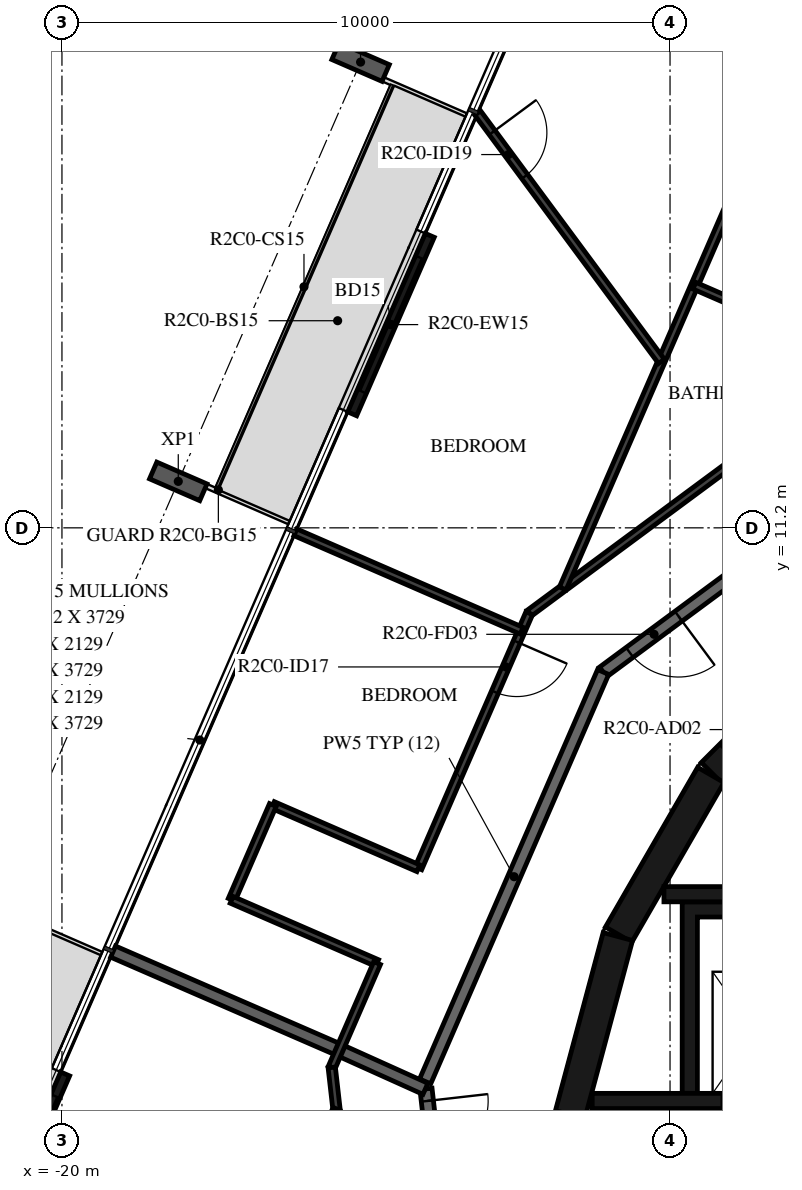
"""IFC4 building model, lengths in metres.
Left out: names, types, materials, properties, quantities, classifications, styles, units other than length and angle.
Written with IfcOpenShell. Run it as: python <this file> out.ifc"""

import sys

from ifc_helpers import new_model, si_unit, direction, frame, frame_2d, origin, origin_2d, place, context, subcontext, project, spatial, polyline, rectangle, i_section, outline, extrude, element, fill, save


model = new_model("IFC4")
c1 = context("Model", 3, precision=1e-05, world=origin(), true_north=direction((0.0, 1.0)))
c2 = subcontext(c1, "Body", "Model", "MODEL_VIEW")
j1 = project(units=[si_unit("LENGTHUNIT", "METRE"), si_unit("PLANEANGLEUNIT", "RADIAN")], contexts=[c1])
p1 = place(None, origin())
s1 = spatial("IfcSite", under=j1, at=p1, CompositionType="ELEMENT")
p2 = place(p1, origin())
s2 = spatial("IfcBuilding", under=s1, at=p2, CompositionType="ELEMENT")
p3 = place(p2, frame((0.0, 0.0, 104.7)))
s3 = spatial("IfcBuildingStorey", under=s2, at=p3, CompositionType="ELEMENT", Elevation=104.7)
for number, where, z_axis, x_axis in (
    (1, (-15.089, 18.859, -0.38), (0.0, 0.0, 1.0), (0.399, 0.917, 0.0)),
    (2, (-18.087, 11.964, -0.38), (0.0, 0.0, 1.0), (0.399, 0.917, 0.0)),
):
    element("IfcColumn", number, at=place(p3, frame(where, z_axis=z_axis, x_axis=x_axis)), inside=s3, PredefinedType="COLUMN", context=c2, shape_type="SweptSolid", body=[
        extrude(i_section(OverallWidth=0.3, OverallDepth=0.9, WebThickness=0.019, FlangeThickness=0.035, FilletRadius=0.03, at=origin_2d()), origin(), (0.0, 0.0, 1.0), 2.616),
    ])
p4 = place(p3, frame((-13.951, 16.01, 0.0), z_axis=(0.0, 0.0, 1.0), x_axis=(-0.398720531764, -0.917072482168, 0.0)))
e3 = element("IfcWall", 3, at=p4, inside=s3, PredefinedType="STANDARD", context=c2, shape_type="SweptSolid", body=[
    extrude(rectangle(XDim=3.2, YDim=0.16, at=frame_2d((1.6, 0.0))), origin(), (0.0, 0.0, 1.0), 3.05),
])
p5 = place(p4, frame((0.4, 0.0, 0.0)))
e4 = element("IfcOpeningElement", 4, at=p5, cuts=e3, PredefinedType="OPENING", context=c2, shape_type="SweptSolid", body=[
    extrude(rectangle(XDim=2.4, YDim=2.4, at=frame_2d((1.2, 1.2))), frame((0.0, 0.09, 0.0), z_axis=(0.0, -1.0, 0.0), x_axis=(1.0, 0.0, 0.0)), (0.0, 0.0, 1.0), 0.18),
])
p6 = place(p3, frame((-19.947, 2.219, 0.0), z_axis=(0.0, 0.0, 1.0), x_axis=(-0.398784695066, -0.917044582876, 0.0)))
e5 = element("IfcWall", 5, at=p6, inside=s3, PredefinedType="STANDARD", context=c2, shape_type="SweptSolid", body=[
    extrude(rectangle(XDim=3.2, YDim=0.16, at=frame_2d((1.6, 0.0))), origin(), (0.0, 0.0, 1.0), 3.05),
])
p7 = place(p6, frame((0.4, 0.0, 0.0)))
e6 = element("IfcOpeningElement", 6, at=p7, cuts=e5, PredefinedType="OPENING", context=c2, shape_type="SweptSolid", body=[
    extrude(rectangle(XDim=2.4, YDim=2.4, at=frame_2d((1.2, 1.2))), frame((0.0, 0.09, 0.0), z_axis=(0.0, -1.0, 0.0), x_axis=(1.0, 0.0, 0.0)), (0.0, 0.0, 1.0), 0.18),
])
p8 = place(p3, frame((-7.164, 9.308, 0.0), z_axis=(0.0, 0.0, 1.0), x_axis=(-0.707106781187, -0.707106781187, 0.0)))
e7 = element("IfcWall", 7, at=p8, inside=s3, PredefinedType="SHEAR", context=c2, shape_type="SweptSolid", body=[
    extrude(rectangle(XDim=3.032, YDim=0.5, at=frame_2d((1.516, 0.0))), origin(), (0.0, 0.0, 1.0), 3.05),
])
p9 = place(p8, frame((1.416, 0.0, 0.0)))
e8 = element("IfcOpeningElement", 8, at=p9, cuts=e7, PredefinedType="OPENING", context=c2, shape_type="SweptSolid", body=[
    extrude(rectangle(XDim=1.2, YDim=2.1, at=frame_2d((0.6, 1.05))), frame((0.0, 0.26, 0.0), z_axis=(0.0, -1.0, 0.0), x_axis=(1.0, 0.0, 0.0)), (0.0, 0.0, 1.0), 0.52),
])
for number, where, z_axis, x_axis in (
    (9, (-9.329, 7.137, 0.0), (0.0, 0.0, 1.0), (-0.5, -0.866, 0.0)),
    (10, (-10.858, 4.479, 0.0), (0.0, 0.0, 1.0), (-0.259, -0.966, 0.0)),
):
    element("IfcWall", number, at=place(p3, frame(where, z_axis=z_axis, x_axis=x_axis)), inside=s3, PredefinedType="SHEAR", context=c2, shape_type="SweptSolid", body=[
        extrude(rectangle(XDim=3.033, YDim=0.5, at=frame_2d((1.516, 0.0))), origin(), (0.0, 0.0, 1.0), 3.05),
    ])
p10 = place(p3, frame((-7.0, 5.175, 0.0), z_axis=(0.0, 0.0, 1.0), x_axis=(-1.0, 0.0, 0.0)))
e11 = element("IfcWall", 11, at=p10, inside=s3, PredefinedType="SHEAR", context=c2, shape_type="SweptSolid", body=[
    extrude(rectangle(XDim=3.1, YDim=0.25, at=frame_2d((1.55, 0.0))), origin(), (0.0, 0.0, 1.0), 3.05),
])
p11 = place(p3, origin())
e12 = element("IfcWall", 12, at=p11, inside=s3, PredefinedType="SHEAR", context=c2, shape_type="SweptSolid", body=[
    extrude(outline(polyline([(-9.55, 4.8), (-7.65, 4.8), (-7.65, 1.9), (-7.4, 1.9), (-7.4, 4.8), (-5.5, 4.8), (-5.5, 1.9), (-5.25, 1.9), (-5.25, 4.8), (-3.35, 4.8), (-3.35, 1.9), (-3.1, 1.9), (-3.1, 4.8), (-1.2, 4.8), (-1.2, 1.9), (-0.95, 1.9), (-0.95, 4.8), (0.95, 4.8), (0.95, 1.9), (1.2, 1.9), (1.2, 4.8), (3.1, 4.8), (3.1, 1.9), (3.35, 1.9), (3.35, 4.8), (5.25, 4.8), (5.25, 1.9), (5.5, 1.9), (5.5, 4.8), (7.4, 4.8), (7.4, 1.9), (7.65, 1.9), (7.65, 4.8), (9.55, 4.8), (9.55, 1.9), (9.8, 1.9), (9.8, 4.8), (9.8, 5.05), (-9.8, 5.05), (-9.8, 4.8), (-9.8, 1.9), (-9.55, 1.9), (-9.55, 4.8)])), origin(), (0.0, 0.0, 1.0), 3.05),
])
p12 = place(p3, frame((-11.28, 1.775, 0.0), z_axis=(0.0, 0.0, 1.0), x_axis=(1.0, 0.0, 0.0)))
e13 = element("IfcWall", 13, at=p12, inside=s3, PredefinedType="SHEAR", context=c2, shape_type="SweptSolid", body=[
    extrude(rectangle(XDim=14.38, YDim=0.25, at=frame_2d((7.19, 0.0))), origin(), (0.0, 0.0, 1.0), 3.05),
])
p13 = place(p12, frame((2.13, 0.0, 0.0)))
e14 = element("IfcOpeningElement", 14, at=p13, cuts=e13, PredefinedType="OPENING", context=c2, shape_type="SweptSolid", body=[
    extrude(rectangle(XDim=1.1, YDim=2.1, at=frame_2d((0.55, 1.05))), frame((0.0, 0.135, 0.0), z_axis=(0.0, -1.0, 0.0), x_axis=(1.0, 0.0, 0.0)), (0.0, 0.0, 1.0), 0.27),
])
p14 = place(p12, frame((4.28, 0.0, 0.0)))
e15 = element("IfcOpeningElement", 15, at=p14, cuts=e13, PredefinedType="OPENING", context=c2, shape_type="SweptSolid", body=[
    extrude(rectangle(XDim=1.1, YDim=2.1, at=frame_2d((0.55, 1.05))), frame((0.0, 0.135, 0.0), z_axis=(0.0, -1.0, 0.0), x_axis=(1.0, 0.0, 0.0)), (0.0, 0.0, 1.0), 0.27),
])
p15 = place(p12, frame((6.43, 0.0, 0.0)))
e16 = element("IfcOpeningElement", 16, at=p15, cuts=e13, PredefinedType="OPENING", context=c2, shape_type="SweptSolid", body=[
    extrude(rectangle(XDim=1.1, YDim=2.1, at=frame_2d((0.55, 1.05))), frame((0.0, 0.135, 0.0), z_axis=(0.0, -1.0, 0.0), x_axis=(1.0, 0.0, 0.0)), (0.0, 0.0, 1.0), 0.27),
])
p16 = place(p12, frame((8.58, 0.0, 0.0)))
e17 = element("IfcOpeningElement", 17, at=p16, cuts=e13, PredefinedType="OPENING", context=c2, shape_type="SweptSolid", body=[
    extrude(rectangle(XDim=1.1, YDim=2.1, at=frame_2d((0.55, 1.05))), frame((0.0, 0.135, 0.0), z_axis=(0.0, -1.0, 0.0), x_axis=(1.0, 0.0, 0.0)), (0.0, 0.0, 1.0), 0.27),
])
p17 = place(p12, frame((10.83, 0.0, 0.0)))
e18 = element("IfcOpeningElement", 18, at=p17, cuts=e13, PredefinedType="OPENING", context=c2, shape_type="SweptSolid", body=[
    extrude(rectangle(XDim=0.9, YDim=2.1, at=frame_2d((0.45, 1.05))), frame((0.0, 0.135, 0.0), z_axis=(0.0, -1.0, 0.0), x_axis=(1.0, 0.0, 0.0)), (0.0, 0.0, 1.0), 0.27),
])
p18 = place(p12, frame((12.98, 0.0, 0.0)))
e19 = element("IfcOpeningElement", 19, at=p18, cuts=e13, PredefinedType="OPENING", context=c2, shape_type="SweptSolid", body=[
    extrude(rectangle(XDim=0.9, YDim=2.1, at=frame_2d((0.45, 1.05))), frame((0.0, 0.135, 0.0), z_axis=(0.0, -1.0, 0.0), x_axis=(1.0, 0.0, 0.0)), (0.0, 0.0, 1.0), 0.27),
])
p19 = place(p3, frame((-5.198, 13.196, 0.0), z_axis=(0.0, 0.0, 1.0), x_axis=(-0.803869883159, -0.594805187394, 0.0)))
e20 = element("IfcWall", 20, at=p19, inside=s3, PredefinedType="STANDARD", context=c2, shape_type="SweptSolid", body=[
    extrude(rectangle(XDim=7.342, YDim=0.2, at=frame_2d((3.671, 0.0))), origin(), (0.0, 0.0, 1.0), 3.05),
])
p20 = place(p19, frame((5.8, 0.0, 0.0)))
e21 = element("IfcOpeningElement", 21, at=p20, cuts=e20, PredefinedType="OPENING", context=c2, shape_type="SweptSolid", body=[
    extrude(rectangle(XDim=1.0, YDim=2.1, at=frame_2d((0.5, 1.05))), frame((0.0, 0.11, 0.0), z_axis=(0.0, -1.0, 0.0), x_axis=(1.0, 0.0, 0.0)), (0.0, 0.0, 1.0), 0.22),
])
p21 = place(p3, frame((-11.1, 8.829, 0.0), z_axis=(0.0, 0.0, 1.0), x_axis=(-0.398741918631, -0.917063183388, 0.0)))
e22 = element("IfcWall", 22, at=p21, inside=s3, PredefinedType="STANDARD", context=c2, shape_type="SweptSolid", body=[
    extrude(rectangle(XDim=7.342, YDim=0.2, at=frame_2d((3.671, 0.0))), origin(), (0.0, 0.0, 1.0), 3.05),
])
p22 = place(p3, frame((-14.013, 1.974, 0.0), z_axis=(0.0, 0.0, 1.0), x_axis=(0.113196526349, -0.993572617589, 0.0)))
e23 = element("IfcWall", 23, at=p22, inside=s3, PredefinedType="STANDARD", context=c2, shape_type="SweptSolid", body=[
    extrude(rectangle(XDim=7.219, YDim=0.2, at=frame_2d((3.609, 0.0))), origin(), (0.0, 0.0, 1.0), 3.05),
])
p23 = place(p22, frame((0.2, 0.0, 0.0)))
e24 = element("IfcOpeningElement", 24, at=p23, cuts=e23, PredefinedType="OPENING", context=c2, shape_type="SweptSolid", body=[
    extrude(rectangle(XDim=1.0, YDim=2.1, at=frame_2d((0.5, 1.05))), frame((0.0, 0.11, 0.0), z_axis=(0.0, -1.0, 0.0), x_axis=(1.0, 0.0, 0.0)), (0.0, 0.0, 1.0), 0.22),
])
p24 = place(p3, frame((-15.475, 2.629, 0.0), z_axis=(0.0, 0.0, 1.0), x_axis=(0.911720699372, -0.410810621011, 0.0)))
e25 = element("IfcWall", 25, at=p24, inside=s3, PredefinedType="STANDARD", context=c2, shape_type="SweptSolid", body=[
    extrude(rectangle(XDim=1.593, YDim=0.2, at=frame_2d((0.797, 0.0))), origin(), (0.0, 0.0, 1.0), 3.05),
])
p25 = place(p3, frame((-19.159, 4.231, 0.0), z_axis=(0.0, 0.0, 1.0), x_axis=(0.917067157668, -0.398732778095, 0.0)))
e26 = element("IfcWall", 26, at=p25, inside=s3, PredefinedType="STANDARD", context=c2, shape_type="SweptSolid", body=[
    extrude(rectangle(XDim=4.017, YDim=0.2, at=frame_2d((2.009, 0.0))), origin(), (0.0, 0.0, 1.0), 3.05),
])
p26 = place(p3, frame((-5.767, 14.641, 0.0), z_axis=(0.0, 0.0, 1.0), x_axis=(-0.803853364238, -0.594827511807, 0.0)))
e27 = element("IfcWall", 27, at=p26, inside=s3, PredefinedType="PARTITIONING", context=c2, shape_type="SweptSolid", body=[
    extrude(rectangle(XDim=8.146, YDim=0.12, at=frame_2d((4.073, 0.0))), origin(), (0.0, 0.0, 1.0), 3.05),
])
p27 = place(p26, frame((1.592, 0.0, 0.0)))
e28 = element("IfcOpeningElement", 28, at=p27, cuts=e27, PredefinedType="OPENING", context=c2, shape_type="SweptSolid", body=[
    extrude(rectangle(XDim=0.8, YDim=2.1, at=frame_2d((0.4, 1.05))), frame((0.0, 0.07, 0.0), z_axis=(0.0, -1.0, 0.0), x_axis=(1.0, 0.0, 0.0)), (0.0, 0.0, 1.0), 0.14),
])
p28 = place(p3, frame((-12.315, 9.796, 0.0), z_axis=(0.0, 0.0, 1.0), x_axis=(-0.398765150511, -0.917053081745, 0.0)))
e29 = element("IfcWall", 29, at=p28, inside=s3, PredefinedType="PARTITIONING", context=c2, shape_type="SweptSolid", body=[
    extrude(rectangle(XDim=4.573, YDim=0.12, at=frame_2d((2.287, 0.0))), origin(), (0.0, 0.0, 1.0), 3.05),
])
p29 = place(p28, frame((0.513, 0.0, 0.0)))
e30 = element("IfcOpeningElement", 30, at=p29, cuts=e29, PredefinedType="OPENING", context=c2, shape_type="SweptSolid", body=[
    extrude(rectangle(XDim=0.9, YDim=2.1, at=frame_2d((0.45, 1.05))), frame((0.0, 0.07, 0.0), z_axis=(0.0, -1.0, 0.0), x_axis=(1.0, 0.0, 0.0)), (0.0, 0.0, 1.0), 0.14),
])
p30 = place(p3, frame((-14.139, 5.602, 0.0), z_axis=(0.0, 0.0, 1.0), x_axis=(-0.91706559301, 0.398736376716, 0.0)))
e31 = element("IfcWall", 31, at=p30, inside=s3, PredefinedType="PARTITIONING", context=c2, shape_type="SweptSolid", body=[
    extrude(rectangle(XDim=2.609, YDim=0.12, at=frame_2d((1.304, 0.0))), origin(), (0.0, 0.0, 1.0), 3.05),
])
p31 = place(p3, frame((-16.531, 6.642, 0.0), z_axis=(0.0, 0.0, 1.0), x_axis=(-0.398783871208, -0.917044941137, 0.0)))
e32 = element("IfcWall", 32, at=p31, inside=s3, PredefinedType="PARTITIONING", context=c2, shape_type="SweptSolid", body=[
    extrude(rectangle(XDim=1.7, YDim=0.12, at=frame_2d((0.85, 0.0))), origin(), (0.0, 0.0, 1.0), 3.05),
])
p32 = place(p3, frame((-17.209, 5.083, 0.0), z_axis=(0.0, 0.0, 1.0), x_axis=(0.91706559301, -0.398736376716, 0.0)))
e33 = element("IfcWall", 33, at=p32, inside=s3, PredefinedType="PARTITIONING", context=c2, shape_type="SweptSolid", body=[
    extrude(rectangle(XDim=2.609, YDim=0.12, at=frame_2d((1.304, 0.0))), origin(), (0.0, 0.0, 1.0), 3.05),
])
p33 = place(p3, frame((-14.817, 4.043, 0.0), z_axis=(0.0, 0.0, 1.0), x_axis=(-0.398683191722, -0.917088715795, 0.0)))
e34 = element("IfcWall", 34, at=p33, inside=s3, PredefinedType="PARTITIONING", context=c2, shape_type="SweptSolid", body=[
    extrude(rectangle(XDim=1.872, YDim=0.12, at=frame_2d((0.936, 0.0))), origin(), (0.0, 0.0, 1.0), 3.05),
])
p34 = place(p3, frame((-5.952, 23.571, 0.0), z_axis=(0.0, 0.0, 1.0), x_axis=(-0.398745097158, -0.917061801348, 0.0)))
e35 = element("IfcWall", 35, at=p34, inside=s3, PredefinedType="PARTITIONING", context=c2, shape_type="SweptSolid", body=[
    extrude(rectangle(XDim=14.576, YDim=0.12, at=frame_2d((7.288, 0.0))), origin(), (0.0, 0.0, 1.0), 3.05),
])
p35 = place(p34, frame((3.878, 0.0, 0.0)))
e36 = element("IfcOpeningElement", 36, at=p35, cuts=e35, PredefinedType="OPENING", context=c2, shape_type="SweptSolid", body=[
    extrude(rectangle(XDim=0.9, YDim=2.1, at=frame_2d((0.45, 1.05))), frame((0.0, 0.07, 0.0), z_axis=(0.0, -1.0, 0.0), x_axis=(1.0, 0.0, 0.0)), (0.0, 0.0, 1.0), 0.14),
])
p36 = place(p34, frame((0.2, 0.0, 0.0)))
e37 = element("IfcOpeningElement", 37, at=p36, cuts=e35, PredefinedType="OPENING", context=c2, shape_type="SweptSolid", body=[
    extrude(rectangle(XDim=0.9, YDim=2.1, at=frame_2d((0.45, 1.05))), frame((0.0, 0.07, 0.0), z_axis=(0.0, -1.0, 0.0), x_axis=(1.0, 0.0, 0.0)), (0.0, 0.0, 1.0), 0.14),
])
p37 = place(p3, frame((-9.6, 15.182, 0.0), z_axis=(0.0, 0.0, 1.0), x_axis=(0.917073771145, -0.398717567054, 0.0)))
e38 = element("IfcWall", 38, at=p37, inside=s3, PredefinedType="PARTITIONING", context=c2, shape_type="SweptSolid", body=[
    extrude(rectangle(XDim=3.135, YDim=0.12, at=frame_2d((1.567, 0.0))), origin(), (0.0, 0.0, 1.0), 3.05),
])
p38 = place(p3, frame((-13.163, 18.022, 0.0), z_axis=(0.0, 0.0, 1.0), x_axis=(0.594797671626, -0.803875444226, 0.0)))
e39 = element("IfcWall", 39, at=p38, inside=s3, PredefinedType="PARTITIONING", context=c2, shape_type="SweptSolid", body=[
    extrude(rectangle(XDim=5.081, YDim=0.12, at=frame_2d((2.54, 0.0))), origin(), (0.0, 0.0, 1.0), 3.05),
])
p39 = place(p38, frame((0.4, 0.0, 0.0)))
e40 = element("IfcOpeningElement", 40, at=p39, cuts=e39, PredefinedType="OPENING", context=c2, shape_type="SweptSolid", body=[
    extrude(rectangle(XDim=0.9, YDim=2.1, at=frame_2d((0.45, 1.05))), frame((0.0, 0.07, 0.0), z_axis=(0.0, -1.0, 0.0), x_axis=(1.0, 0.0, 0.0)), (0.0, 0.0, 1.0), 0.14),
])
p40 = place(p3, frame((-16.161, 11.126, 0.0), z_axis=(0.0, 0.0, 1.0), x_axis=(0.91705953326, -0.398750313425, 0.0)))
e41 = element("IfcWall", 41, at=p40, inside=s3, PredefinedType="PARTITIONING", context=c2, shape_type="SweptSolid", body=[
    extrude(rectangle(XDim=4.057, YDim=0.12, at=frame_2d((2.029, 0.0))), origin(), (0.0, 0.0, 1.0), 3.05),
])
p41 = place(p3, frame((-15.563, 2.326, 0.0), z_axis=(0.0, 0.0, 1.0), x_axis=(0.11320423706, -0.993571739087, 0.0)))
e42 = element("IfcWall", 42, at=p41, inside=s3, PredefinedType="PARTITIONING", context=c2, shape_type="SweptSolid", body=[
    extrude(rectangle(XDim=8.146, YDim=0.12, at=frame_2d((4.073, 0.0))), origin(), (0.0, 0.0, 1.0), 3.05),
])
p42 = place(p41, frame((2.185, 0.0, 0.0)))
e43 = element("IfcOpeningElement", 43, at=p42, cuts=e42, PredefinedType="OPENING", context=c2, shape_type="SweptSolid", body=[
    extrude(rectangle(XDim=0.8, YDim=2.1, at=frame_2d((0.4, 1.05))), frame((0.0, 0.07, 0.0), z_axis=(0.0, -1.0, 0.0), x_axis=(1.0, 0.0, 0.0)), (0.0, 0.0, 1.0), 0.14),
])
p43 = place(p3, frame((-21.298, -11.722, 0.0), z_axis=(0.0, 0.0, 1.0), x_axis=(0.398738972546, 0.91706446435, 0.0)))
e44 = element("IfcWall", 44, at=p43, inside=s3, PredefinedType="PARTITIONING", context=c2, shape_type="SweptSolid", body=[
    extrude(rectangle(XDim=14.577, YDim=0.12, at=frame_2d((7.288, 0.0))), origin(), (0.0, 0.0, 1.0), 3.05),
])
p44 = place(p43, frame((2.841, 0.0, 0.0)))
e45 = element("IfcOpeningElement", 45, at=p44, cuts=e44, PredefinedType="OPENING", context=c2, shape_type="SweptSolid", body=[
    extrude(rectangle(XDim=0.9, YDim=2.1, at=frame_2d((0.45, 1.05))), frame((0.0, 0.07, 0.0), z_axis=(0.0, -1.0, 0.0), x_axis=(1.0, 0.0, 0.0)), (0.0, 0.0, 1.0), 0.14),
])
p45 = place(p43, frame((0.605, 0.0, 0.0)))
e46 = element("IfcOpeningElement", 46, at=p45, cuts=e44, PredefinedType="OPENING", context=c2, shape_type="SweptSolid", body=[
    extrude(rectangle(XDim=0.9, YDim=2.1, at=frame_2d((0.45, 1.05))), frame((0.0, 0.07, 0.0), z_axis=(0.0, -1.0, 0.0), x_axis=(1.0, 0.0, 0.0)), (0.0, 0.0, 1.0), 0.14),
])
p46 = place(p5, origin())
e47 = element("IfcDoor", 47, at=p46, inside=s3, OperationType="DOUBLE_DOOR_SLIDING", PredefinedType="DOOR", context=c2, shape_type="SweptSolid", body=[
    extrude(rectangle(XDim=2.4, YDim=2.4, at=frame_2d((1.2, 1.2))), frame((0.0, 0.025, 0.0), z_axis=(0.0, -1.0, 0.0), x_axis=(1.0, 0.0, 0.0)), (0.0, 0.0, 1.0), 0.05),
])
fill(e4, e47)
p47 = place(p7, origin())
e48 = element("IfcDoor", 48, at=p47, inside=s3, OperationType="DOUBLE_DOOR_SLIDING", PredefinedType="DOOR", context=c2, shape_type="SweptSolid", body=[
    extrude(rectangle(XDim=2.4, YDim=2.4, at=frame_2d((1.2, 1.2))), frame((0.0, 0.025, 0.0), z_axis=(0.0, -1.0, 0.0), x_axis=(1.0, 0.0, 0.0)), (0.0, 0.0, 1.0), 0.05),
])
fill(e6, e48)
p48 = place(p13, origin())
e49 = element("IfcDoor", 49, at=p48, inside=s3, OperationType="DOUBLE_DOOR_SLIDING", PredefinedType="DOOR", context=c2, shape_type="SweptSolid", body=[
    extrude(rectangle(XDim=1.1, YDim=2.1, at=frame_2d((0.55, 1.05))), frame((0.0, 0.025, 0.0), z_axis=(0.0, -1.0, 0.0), x_axis=(1.0, 0.0, 0.0)), (0.0, 0.0, 1.0), 0.05),
])
fill(e14, e49)
p49 = place(p20, origin())
e50 = element("IfcDoor", 50, at=p49, inside=s3, OperationType="SINGLE_SWING_LEFT", PredefinedType="DOOR", context=c2, shape_type="SweptSolid", body=[
    extrude(rectangle(XDim=1.0, YDim=2.1, at=frame_2d((0.5, 1.05))), frame((0.0, 0.025, 0.0), z_axis=(0.0, -1.0, 0.0), x_axis=(1.0, 0.0, 0.0)), (0.0, 0.0, 1.0), 0.05),
])
fill(e21, e50)
p50 = place(p29, origin())
e51 = element("IfcDoor", 51, at=p50, inside=s3, OperationType="SINGLE_SWING_LEFT", PredefinedType="DOOR", context=c2, shape_type="SweptSolid", body=[
    extrude(rectangle(XDim=0.9, YDim=2.1, at=frame_2d((0.45, 1.05))), frame((0.0, 0.025, 0.0), z_axis=(0.0, -1.0, 0.0), x_axis=(1.0, 0.0, 0.0)), (0.0, 0.0, 1.0), 0.05),
])
fill(e30, e51)
p51 = place(p39, origin())
e52 = element("IfcDoor", 52, at=p51, inside=s3, OperationType="SINGLE_SWING_RIGHT", PredefinedType="DOOR", context=c2, shape_type="SweptSolid", body=[
    extrude(rectangle(XDim=0.9, YDim=2.1, at=frame_2d((0.45, 1.05))), frame((0.0, 0.025, 0.0), z_axis=(0.0, -1.0, 0.0), x_axis=(1.0, 0.0, 0.0)), (0.0, 0.0, 1.0), 0.05),
])
fill(e40, e52)
p52 = place(p23, origin())
e53 = element("IfcDoor", 53, at=p52, inside=s3, OperationType="SINGLE_SWING_RIGHT", PredefinedType="DOOR", context=c2, shape_type="SweptSolid", body=[
    extrude(rectangle(XDim=1.0, YDim=2.1, at=frame_2d((0.5, 1.05))), frame((0.0, 0.025, 0.0), z_axis=(0.0, -1.0, 0.0), x_axis=(1.0, 0.0, 0.0)), (0.0, 0.0, 1.0), 0.05),
])
fill(e24, e53)
save(model, sys.argv[1])
